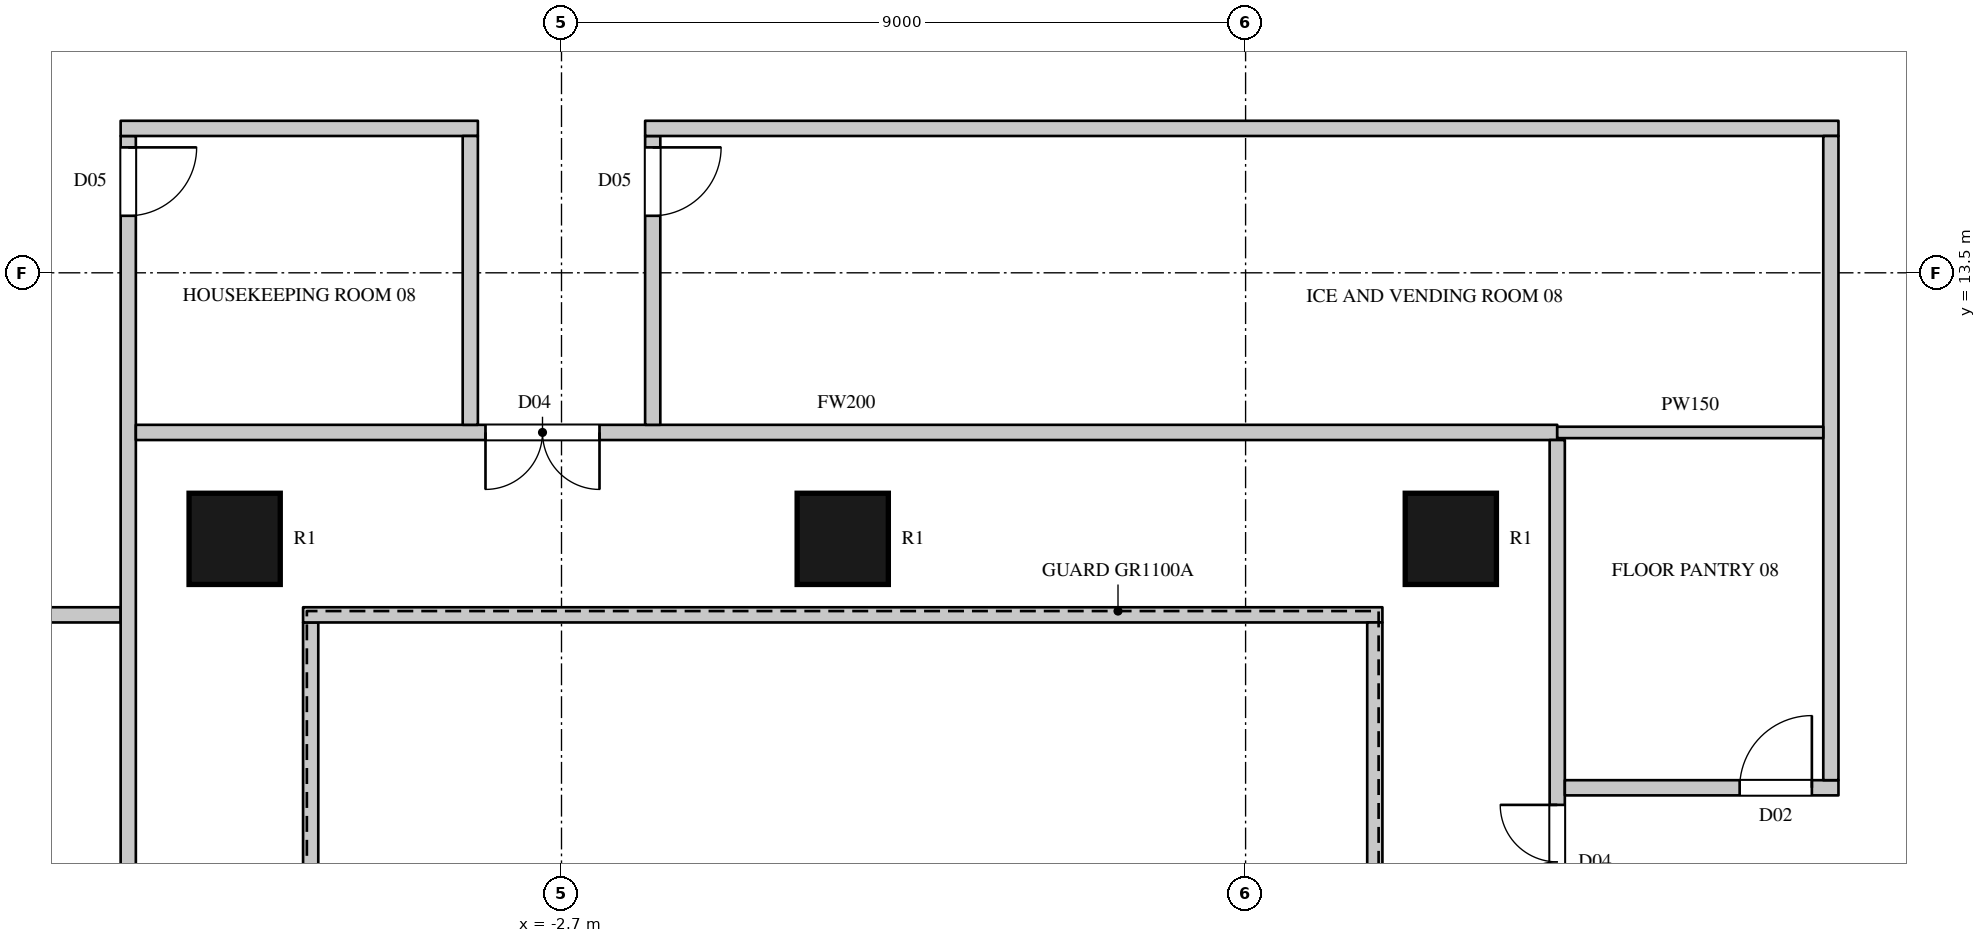
"""IFC4 building model, lengths in metres.
Left out: names, types, materials, properties, quantities, classifications, styles, units other than length and angle.
Written with IfcOpenShell. Run it as: python <this file> out.ifc"""

import sys

from ifc_helpers import new_model, si_unit, direction, frame, frame_2d, origin, origin_2d, place, context, subcontext, project, spatial, rectangle, circle, extrude, element, fill, save


model = new_model("IFC4")
c1 = context("Model", 3, precision=1e-05, world=origin(), true_north=direction((0.0, 1.0)))
c2 = subcontext(c1, "Body", "Model", "MODEL_VIEW")
j1 = project(units=[si_unit("LENGTHUNIT", "METRE"), si_unit("PLANEANGLEUNIT", "RADIAN")], contexts=[c1])
p1 = place(None, origin())
s1 = spatial("IfcSite", under=j1, at=p1, CompositionType="ELEMENT")
p2 = place(p1, origin())
s2 = spatial("IfcBuilding", under=s1, at=p2, CompositionType="ELEMENT")
p3 = place(p2, frame((0.0, 0.0, 59.1)))
s3 = spatial("IfcBuildingStorey", under=s2, at=p3, CompositionType="ELEMENT", Elevation=59.1)
for number, where, z_axis, x_axis in (
    (1, (-7.0, 10.0, 0.0), (0.0, 0.0, 1.0), (1.0, 0.0, 0.0)),
    (2, (1.0, 10.0, 0.0), (0.0, 0.0, 1.0), (1.0, 0.0, 0.0)),
    (3, (9.0, 10.0, 0.0), (0.0, 0.0, 1.0), (1.0, 0.0, 0.0)),
):
    element("IfcColumn", number, at=place(p3, frame(where, z_axis=z_axis, x_axis=x_axis)), inside=s3, PredefinedType="COLUMN", context=c2, shape_type="SweptSolid", body=[
        extrude(circle(Radius=0.6, at=origin_2d()), origin(), (0.0, 0.0, 1.0), 3.6),
    ])
p4 = place(p3, frame((-13.97, 9.0, 0.0), z_axis=(0.0, 0.0, 1.0), x_axis=(1.0, 0.0, 0.0)))
e4 = element("IfcWall", 4, at=p4, inside=s3, PredefinedType="PARTITIONING", context=c2, shape_type="SweptSolid", body=[
    extrude(rectangle(XDim=5.47, YDim=0.2, at=frame_2d((2.735, 0.0))), origin(), (0.0, 0.0, 1.0), 3.3),
])
p5 = place(p3, frame((-8.4, -15.3, 0.0), z_axis=(0.0, 0.0, 1.0), x_axis=(0.0, 1.0, 0.0)))
e5 = element("IfcWall", 5, at=p5, inside=s3, PredefinedType="PARTITIONING", context=c2, shape_type="SweptSolid", body=[
    extrude(rectangle(XDim=30.6, YDim=0.2, at=frame_2d((15.3, 0.0))), origin(), (0.0, 0.0, 1.0), 3.3),
])
p6 = place(p5, frame((19.05, 0.0, 0.0)))
e6 = element("IfcOpeningElement", 6, at=p6, cuts=e5, PredefinedType="OPENING", context=c2, shape_type="SweptSolid", body=[
    extrude(rectangle(XDim=1.5, YDim=2.2, at=frame_2d((0.75, 1.1))), frame((0.0, 0.11, 0.0), z_axis=(0.0, -1.0, 0.0), x_axis=(1.0, 0.0, 0.0)), (0.0, 0.0, 1.0), 0.22),
])
p7 = place(p5, frame((29.55, 0.0, 0.0)))
e7 = element("IfcOpeningElement", 7, at=p7, cuts=e5, PredefinedType="OPENING", context=c2, shape_type="SweptSolid", body=[
    extrude(rectangle(XDim=0.9, YDim=2.2, at=frame_2d((0.45, 1.1))), frame((0.0, 0.11, 0.0), z_axis=(0.0, -1.0, 0.0), x_axis=(1.0, 0.0, 0.0)), (0.0, 0.0, 1.0), 0.22),
])
p8 = place(p5, frame((0.15, 0.0, 0.0)))
e8 = element("IfcOpeningElement", 8, at=p8, cuts=e5, PredefinedType="OPENING", context=c2, shape_type="SweptSolid", body=[
    extrude(rectangle(XDim=0.9, YDim=2.2, at=frame_2d((0.45, 1.1))), frame((0.0, 0.11, 0.0), z_axis=(0.0, -1.0, 0.0), x_axis=(1.0, 0.0, 0.0)), (0.0, 0.0, 1.0), 0.22),
])
p9 = place(p3, frame((-8.3, 11.4, 0.0), z_axis=(0.0, 0.0, 1.0), x_axis=(1.0, 0.0, 0.0)))
e9 = element("IfcWall", 9, at=p9, inside=s3, PredefinedType="PARTITIONING", context=c2, shape_type="SweptSolid", body=[
    extrude(rectangle(XDim=18.7, YDim=0.2, at=frame_2d((9.35, 0.0))), origin(), (0.0, 0.0, 1.0), 3.3),
])
p10 = place(p9, frame((4.6, 0.0, 0.0)))
e10 = element("IfcOpeningElement", 10, at=p10, cuts=e9, PredefinedType="OPENING", context=c2, shape_type="SweptSolid", body=[
    extrude(rectangle(XDim=1.5, YDim=2.2, at=frame_2d((0.75, 1.1))), frame((0.0, 0.11, 0.0), z_axis=(0.0, -1.0, 0.0), x_axis=(1.0, 0.0, 0.0)), (0.0, 0.0, 1.0), 0.22),
])
p11 = place(p3, frame((-8.5, 15.4, 0.0), z_axis=(0.0, 0.0, 1.0), x_axis=(1.0, 0.0, 0.0)))
e11 = element("IfcWall", 11, at=p11, inside=s3, PredefinedType="PARTITIONING", context=c2, shape_type="SweptSolid", body=[
    extrude(rectangle(XDim=4.7, YDim=0.2, at=frame_2d((2.35, 0.0))), origin(), (0.0, 0.0, 1.0), 3.3),
])
p12 = place(p3, frame((-6.0, -8.9, 0.0), z_axis=(0.0, 0.0, 1.0), x_axis=(0.0, 1.0, 0.0)))
e12 = element("IfcWall", 12, at=p12, inside=s3, PredefinedType="PARTITIONING", context=c2, shape_type="SweptSolid", body=[
    extrude(rectangle(XDim=17.8, YDim=0.2, at=frame_2d((8.9, 0.0))), origin(), (0.0, 0.0, 1.0), 3.3),
])
p13 = place(p3, frame((-6.1, 9.0, 0.0), z_axis=(0.0, 0.0, 1.0), x_axis=(1.0, 0.0, 0.0)))
e13 = element("IfcWall", 13, at=p13, inside=s3, PredefinedType="PARTITIONING", context=c2, shape_type="SweptSolid", body=[
    extrude(rectangle(XDim=14.2, YDim=0.2, at=frame_2d((7.1, 0.0))), origin(), (0.0, 0.0, 1.0), 3.3),
])
p14 = place(p3, frame((-3.9, 11.5, 0.0), z_axis=(0.0, 0.0, 1.0), x_axis=(0.0, 1.0, 0.0)))
e14 = element("IfcWall", 14, at=p14, inside=s3, PredefinedType="PARTITIONING", context=c2, shape_type="SweptSolid", body=[
    extrude(rectangle(XDim=3.8, YDim=0.2, at=frame_2d((1.9, 0.0))), origin(), (0.0, 0.0, 1.0), 3.3),
])
p15 = place(p3, frame((-1.5, 11.5, 0.0), z_axis=(0.0, 0.0, 1.0), x_axis=(0.0, 1.0, 0.0)))
e15 = element("IfcWall", 15, at=p15, inside=s3, PredefinedType="PARTITIONING", context=c2, shape_type="SweptSolid", body=[
    extrude(rectangle(XDim=3.8, YDim=0.2, at=frame_2d((1.9, 0.0))), origin(), (0.0, 0.0, 1.0), 3.3),
])
p16 = place(p15, frame((2.75, 0.0, 0.0)))
e16 = element("IfcOpeningElement", 16, at=p16, cuts=e15, PredefinedType="OPENING", context=c2, shape_type="SweptSolid", body=[
    extrude(rectangle(XDim=0.9, YDim=2.2, at=frame_2d((0.45, 1.1))), frame((0.0, 0.11, 0.0), z_axis=(0.0, -1.0, 0.0), x_axis=(1.0, 0.0, 0.0)), (0.0, 0.0, 1.0), 0.22),
])
p17 = place(p3, frame((-1.6, 15.4, 0.0), z_axis=(0.0, 0.0, 1.0), x_axis=(1.0, 0.0, 0.0)))
e17 = element("IfcWall", 17, at=p17, inside=s3, PredefinedType="PARTITIONING", context=c2, shape_type="SweptSolid", body=[
    extrude(rectangle(XDim=15.7, YDim=0.2, at=frame_2d((7.85, 0.0))), origin(), (0.0, 0.0, 1.0), 3.3),
])
p18 = place(p3, frame((8.0, -8.9, 0.0), z_axis=(0.0, 0.0, 1.0), x_axis=(0.0, 1.0, 0.0)))
e18 = element("IfcWall", 18, at=p18, inside=s3, PredefinedType="PARTITIONING", context=c2, shape_type="SweptSolid", body=[
    extrude(rectangle(XDim=17.8, YDim=0.2, at=frame_2d((8.9, 0.0))), origin(), (0.0, 0.0, 1.0), 3.3),
])
p19 = place(p3, frame((10.4, -11.3, 0.0), z_axis=(0.0, 0.0, 1.0), x_axis=(0.0, 1.0, 0.0)))
e19 = element("IfcWall", 19, at=p19, inside=s3, PredefinedType="PARTITIONING", context=c2, shape_type="SweptSolid", body=[
    extrude(rectangle(XDim=22.6, YDim=0.2, at=frame_2d((11.3, 0.0))), origin(), (0.0, 0.0, 1.0), 3.3),
])
p20 = place(p19, frame((4.8, 0.0, 0.0)))
e20 = element("IfcOpeningElement", 20, at=p20, cuts=e19, PredefinedType="OPENING", context=c2, shape_type="SweptSolid", body=[
    extrude(rectangle(XDim=1.5, YDim=2.2, at=frame_2d((0.75, 1.1))), frame((0.0, 0.11, 0.0), z_axis=(0.0, -1.0, 0.0), x_axis=(1.0, 0.0, 0.0)), (0.0, 0.0, 1.0), 0.22),
])
p21 = place(p19, frame((16.3, 0.0, 0.0)))
e21 = element("IfcOpeningElement", 21, at=p21, cuts=e19, PredefinedType="OPENING", context=c2, shape_type="SweptSolid", body=[
    extrude(rectangle(XDim=1.5, YDim=2.2, at=frame_2d((0.75, 1.1))), frame((0.0, 0.11, 0.0), z_axis=(0.0, -1.0, 0.0), x_axis=(1.0, 0.0, 0.0)), (0.0, 0.0, 1.0), 0.22),
])
p22 = place(p19, frame((11.95, 0.0, 0.0)))
e22 = element("IfcOpeningElement", 22, at=p22, cuts=e19, PredefinedType="OPENING", context=c2, shape_type="SweptSolid", body=[
    extrude(rectangle(XDim=1.5, YDim=2.2, at=frame_2d((0.75, 1.1))), frame((0.0, 0.11, 0.0), z_axis=(0.0, -1.0, 0.0), x_axis=(1.0, 0.0, 0.0)), (0.0, 0.0, 1.0), 0.22),
])
p23 = place(p3, frame((10.5, 6.725, 0.0), z_axis=(0.0, 0.0, 1.0), x_axis=(1.0, 0.0, 0.0)))
e23 = element("IfcWall", 23, at=p23, inside=s3, PredefinedType="PARTITIONING", context=c2, shape_type="SweptSolid", body=[
    extrude(rectangle(XDim=3.6, YDim=0.2, at=frame_2d((1.8, 0.0))), origin(), (0.0, 0.0, 1.0), 3.3),
])
p24 = place(p23, frame((2.3, 0.0, 0.0)))
e24 = element("IfcOpeningElement", 24, at=p24, cuts=e23, PredefinedType="OPENING", context=c2, shape_type="SweptSolid", body=[
    extrude(rectangle(XDim=0.95, YDim=2.2, at=frame_2d((0.475, 1.1))), frame((0.0, 0.11, 0.0), z_axis=(0.0, -1.0, 0.0), x_axis=(1.0, 0.0, 0.0)), (0.0, 0.0, 1.0), 0.22),
])
p25 = place(p3, frame((14.0, 6.825, 0.0), z_axis=(0.0, 0.0, 1.0), x_axis=(0.0, 1.0, 0.0)))
e25 = element("IfcWall", 25, at=p25, inside=s3, PredefinedType="PARTITIONING", context=c2, shape_type="SweptSolid", body=[
    extrude(rectangle(XDim=8.475, YDim=0.2, at=frame_2d((4.238, 0.0))), origin(), (0.0, 0.0, 1.0), 3.3),
])
p26 = place(p3, frame((10.4, 11.4, 0.0), z_axis=(0.0, 0.0, 1.0), x_axis=(1.0, 0.0, 0.0)))
e26 = element("IfcWall", 26, at=p26, inside=s3, PredefinedType="PARTITIONING", context=c2, shape_type="SweptSolid", body=[
    extrude(rectangle(XDim=3.5, YDim=0.15, at=frame_2d((1.75, 0.0))), origin(), (0.0, 0.0, 1.0), 3.3),
])
p27 = place(p10, origin())
e27 = element("IfcDoor", 27, at=p27, inside=s3, OperationType="DOUBLE_DOOR_SINGLE_SWING", PredefinedType="DOOR", context=c2, shape_type="SweptSolid", body=[
    extrude(rectangle(XDim=1.5, YDim=2.2, at=frame_2d((0.75, 1.1))), frame((0.0, 0.025, 0.0), z_axis=(0.0, -1.0, 0.0), x_axis=(1.0, 0.0, 0.0)), (0.0, 0.0, 1.0), 0.05),
])
fill(e10, e27)
p28 = place(p21, origin())
e28 = element("IfcDoor", 28, at=p28, inside=s3, OperationType="DOUBLE_DOOR_SINGLE_SWING", PredefinedType="DOOR", context=c2, shape_type="SweptSolid", body=[
    extrude(rectangle(XDim=1.5, YDim=2.2, at=frame_2d((0.75, 1.1))), frame((0.0, 0.025, 0.0), z_axis=(0.0, -1.0, 0.0), x_axis=(1.0, 0.0, 0.0)), (0.0, 0.0, 1.0), 0.05),
])
fill(e21, e28)
p29 = place(p7, origin())
e29 = element("IfcDoor", 29, at=p29, inside=s3, OperationType="SINGLE_SWING_LEFT", PredefinedType="DOOR", context=c2, shape_type="SweptSolid", body=[
    extrude(rectangle(XDim=0.9, YDim=2.2, at=frame_2d((0.45, 1.1))), frame((0.0, 0.025, 0.0), z_axis=(0.0, -1.0, 0.0), x_axis=(1.0, 0.0, 0.0)), (0.0, 0.0, 1.0), 0.05),
])
fill(e7, e29)
p30 = place(p16, origin())
e30 = element("IfcDoor", 30, at=p30, inside=s3, OperationType="SINGLE_SWING_LEFT", PredefinedType="DOOR", context=c2, shape_type="SweptSolid", body=[
    extrude(rectangle(XDim=0.9, YDim=2.2, at=frame_2d((0.45, 1.1))), frame((0.0, 0.025, 0.0), z_axis=(0.0, -1.0, 0.0), x_axis=(1.0, 0.0, 0.0)), (0.0, 0.0, 1.0), 0.05),
])
fill(e16, e30)
p31 = place(p24, origin())
e31 = element("IfcDoor", 31, at=p31, inside=s3, OperationType="SINGLE_SWING_RIGHT", PredefinedType="DOOR", context=c2, shape_type="SweptSolid", body=[
    extrude(rectangle(XDim=0.95, YDim=2.2, at=frame_2d((0.475, 1.1))), frame((0.0, 0.025, 0.0), z_axis=(0.0, -1.0, 0.0), x_axis=(1.0, 0.0, 0.0)), (0.0, 0.0, 1.0), 0.05),
])
fill(e24, e31)
save(model, sys.argv[1])
